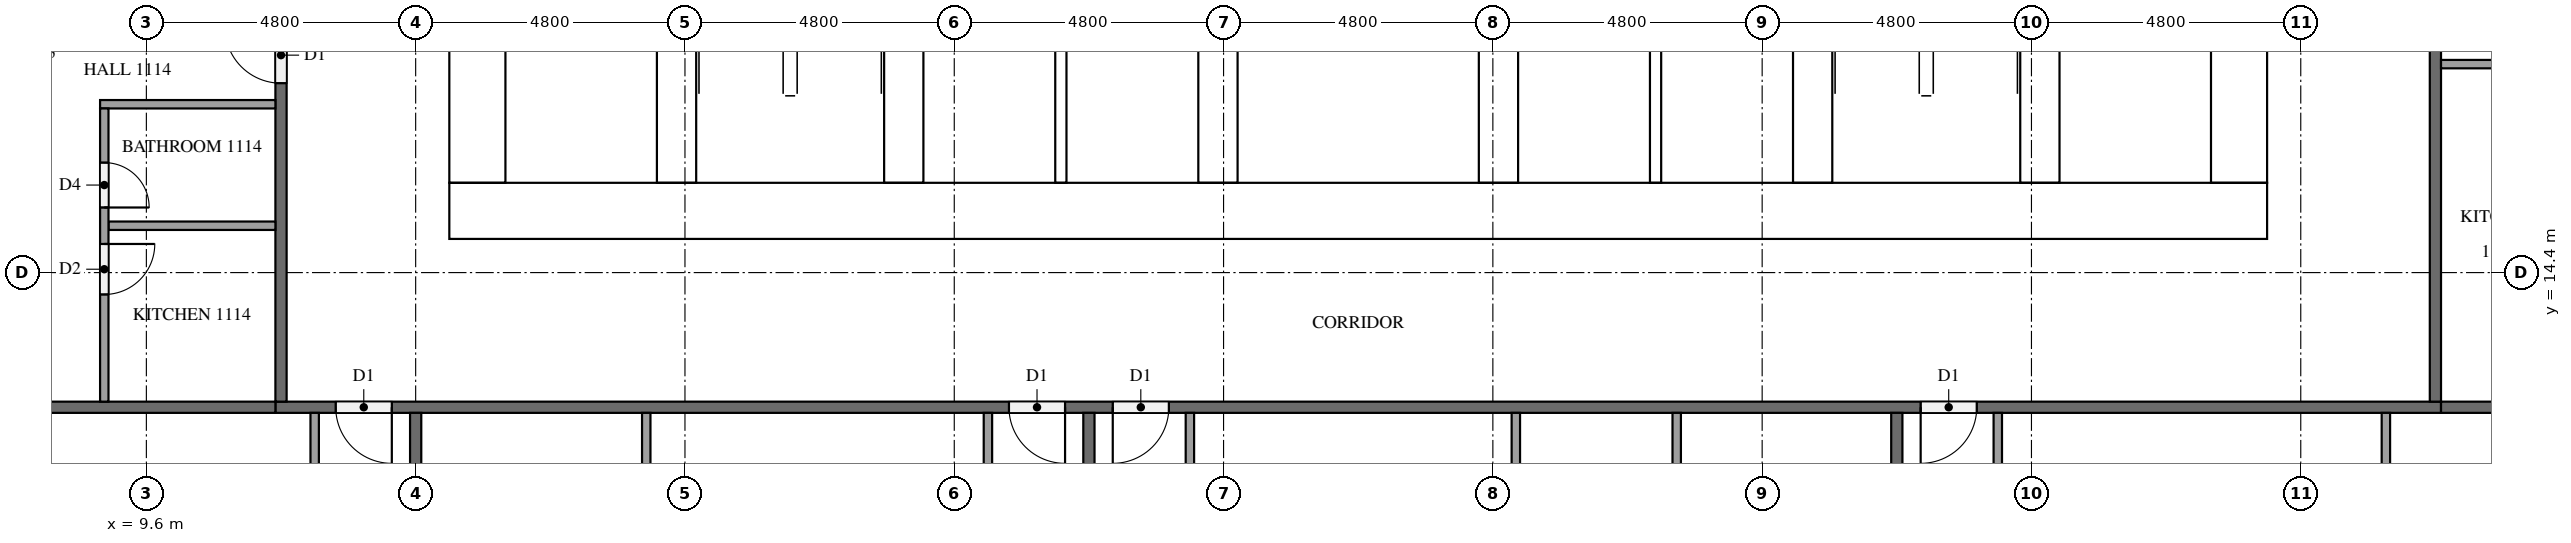
"""IFC4 building model, lengths in metres.
Left out: names, types, materials, properties, quantities, classifications, styles, units other than length and angle.
Written with IfcOpenShell. Run it as: python <this file> out.ifc"""

import sys

from ifc_helpers import new_model, si_unit, direction, frame, frame_2d, origin, place, context, subcontext, project, spatial, rectangle, extrude, element, fill, save


model = new_model("IFC4")
c1 = context("Model", 3, precision=1e-05, world=origin(), true_north=direction((0.0, 1.0)))
c2 = subcontext(c1, "Body", "Model", "MODEL_VIEW")
j1 = project(units=[si_unit("LENGTHUNIT", "METRE"), si_unit("PLANEANGLEUNIT", "RADIAN")], contexts=[c1])
p1 = place(None, origin())
s1 = spatial("IfcSite", under=j1, at=p1, CompositionType="ELEMENT")
p2 = place(p1, origin())
s2 = spatial("IfcBuilding", under=s1, at=p2, CompositionType="ELEMENT")
p3 = place(p2, frame((0.0, 0.0, 46.9)))
s3 = spatial("IfcBuildingStorey", under=s2, at=p3, CompositionType="ELEMENT", Elevation=46.9)
p4 = place(p3, frame((15.0, 15.5, 0.0), z_axis=(0.0, 0.0, 1.0), x_axis=(1.0, 0.0, 0.0)))
e1 = element("IfcWall", 1, at=p4, inside=s3, PredefinedType="SHEAR", context=c2, shape_type="SweptSolid", body=[
    extrude(rectangle(XDim=32.4, YDim=1.0, at=frame_2d((16.2, 0.0))), origin(), (0.0, 0.0, 1.0), 3.2),
])
p5 = place(p4, frame((15.3, 0.0, 0.0)))
e2 = element("IfcOpeningElement", 2, at=p5, cuts=e1, PredefinedType="OPENING", context=c2, shape_type="SweptSolid", body=[
    extrude(rectangle(XDim=1.8, YDim=2.1, at=frame_2d((0.9, 1.05))), frame((0.0, 0.51, 0.0), z_axis=(0.0, -1.0, 0.0), x_axis=(1.0, 0.0, 0.0)), (0.0, 0.0, 1.0), 1.02),
])
p6 = place(p3, frame((15.5, 16.0, 0.0), z_axis=(0.0, 0.0, 1.0), x_axis=(0.0, 1.0, 0.0)))
e3 = element("IfcWall", 3, at=p6, inside=s3, PredefinedType="SHEAR", context=c2, shape_type="SweptSolid", body=[
    extrude(rectangle(XDim=20.8, YDim=1.0, at=frame_2d((10.4, 0.0))), origin(), (0.0, 0.0, 1.0), 3.2),
])
p7 = place(p6, frame((4.76, 0.0, 0.0)))
e4 = element("IfcOpeningElement", 4, at=p7, cuts=e3, PredefinedType="OPENING", context=c2, shape_type="SweptSolid", body=[
    extrude(rectangle(XDim=1.2, YDim=2.1, at=frame_2d((0.6, 1.05))), frame((0.0, 0.51, 0.0), z_axis=(0.0, -1.0, 0.0), x_axis=(1.0, 0.0, 0.0)), (0.0, 0.0, 1.0), 1.02),
])
p8 = place(p3, frame((46.9, 16.0, 0.0), z_axis=(0.0, 0.0, 1.0), x_axis=(0.0, 1.0, 0.0)))
e5 = element("IfcWall", 5, at=p8, inside=s3, PredefinedType="SHEAR", context=c2, shape_type="SweptSolid", body=[
    extrude(rectangle(XDim=20.8, YDim=1.0, at=frame_2d((10.4, 0.0))), origin(), (0.0, 0.0, 1.0), 3.2),
])
p9 = place(p8, frame((10.1, 0.0, 0.0)))
e6 = element("IfcOpeningElement", 6, at=p9, cuts=e5, PredefinedType="OPENING", context=c2, shape_type="SweptSolid", body=[
    extrude(rectangle(XDim=1.2, YDim=2.1, at=frame_2d((0.6, 1.05))), frame((0.0, 0.51, 0.0), z_axis=(0.0, -1.0, 0.0), x_axis=(1.0, 0.0, 0.0)), (0.0, 0.0, 1.0), 1.02),
])
p10 = place(p3, frame((19.05, 16.0, 0.0), z_axis=(0.0, 0.0, 1.0), x_axis=(0.0, 1.0, 0.0)))
e7 = element("IfcWall", 7, at=p10, inside=s3, PredefinedType="SHEAR", context=c2, shape_type="SweptSolid", body=[
    extrude(rectangle(XDim=14.9, YDim=0.7, at=frame_2d((7.45, 0.0))), origin(), (0.0, 0.0, 1.0), 3.2),
])
p11 = place(p10, frame((9.45, 0.0, 0.0)))
e8 = element("IfcOpeningElement", 8, at=p11, cuts=e7, PredefinedType="OPENING", context=c2, shape_type="SweptSolid", body=[
    extrude(rectangle(XDim=1.1, YDim=2.1, at=frame_2d((0.55, 1.05))), frame((0.0, 0.36, 0.0), z_axis=(0.0, -1.0, 0.0), x_axis=(1.0, 0.0, 0.0)), (0.0, 0.0, 1.0), 0.72),
])
p12 = place(p10, frame((12.95, 0.0, 0.0)))
e9 = element("IfcOpeningElement", 9, at=p12, cuts=e7, PredefinedType="OPENING", context=c2, shape_type="SweptSolid", body=[
    extrude(rectangle(XDim=1.1, YDim=2.1, at=frame_2d((0.55, 1.05))), frame((0.0, 0.36, 0.0), z_axis=(0.0, -1.0, 0.0), x_axis=(1.0, 0.0, 0.0)), (0.0, 0.0, 1.0), 0.72),
])
p13 = place(p10, frame((0.2, 0.0, 0.0)))
e10 = element("IfcOpeningElement", 10, at=p13, cuts=e7, PredefinedType="OPENING", context=c2, shape_type="SweptSolid", body=[
    extrude(rectangle(XDim=1.2, YDim=2.1, at=frame_2d((0.6, 1.05))), frame((0.0, 0.36, 0.0), z_axis=(0.0, -1.0, 0.0), x_axis=(1.0, 0.0, 0.0)), (0.0, 0.0, 1.0), 0.72),
])
p14 = place(p3, frame((23.1, 16.0, 0.0), z_axis=(0.0, 0.0, 1.0), x_axis=(0.0, 1.0, 0.0)))
e11 = element("IfcWall", 11, at=p14, inside=s3, PredefinedType="SHEAR", context=c2, shape_type="SweptSolid", body=[
    extrude(rectangle(XDim=20.8, YDim=0.7, at=frame_2d((10.4, 0.0))), origin(), (0.0, 0.0, 1.0), 3.2),
])
p15 = place(p3, frame((39.3, 16.0, 0.0), z_axis=(0.0, 0.0, 1.0), x_axis=(0.0, 1.0, 0.0)))
e12 = element("IfcWall", 12, at=p15, inside=s3, PredefinedType="SHEAR", context=c2, shape_type="SweptSolid", body=[
    extrude(rectangle(XDim=8.25, YDim=0.7, at=frame_2d((4.125, 0.0))), origin(), (0.0, 0.0, 1.0), 3.2),
])
p16 = place(p3, frame((43.35, 16.0, 0.0), z_axis=(0.0, 0.0, 1.0), x_axis=(0.0, 1.0, 0.0)))
e13 = element("IfcWall", 13, at=p16, inside=s3, PredefinedType="SHEAR", context=c2, shape_type="SweptSolid", body=[
    extrude(rectangle(XDim=8.25, YDim=0.7, at=frame_2d((4.125, 0.0))), origin(), (0.0, 0.0, 1.0), 3.2),
])
p17 = place(p16, frame((0.2, 0.0, 0.0)))
e14 = element("IfcOpeningElement", 14, at=p17, cuts=e13, PredefinedType="OPENING", context=c2, shape_type="SweptSolid", body=[
    extrude(rectangle(XDim=1.2, YDim=2.1, at=frame_2d((0.6, 1.05))), frame((0.0, 0.36, 0.0), z_axis=(0.0, -1.0, 0.0), x_axis=(1.0, 0.0, 0.0)), (0.0, 0.0, 1.0), 0.72),
])
for number, where, z_axis, x_axis in (
    (15, (28.7, 16.0, 0.0), (0.0, 0.0, 1.0), (0.0, 1.0, 0.0)),
    (16, (33.7, 16.0, 0.0), (0.0, 0.0, 1.0), (0.0, 1.0, 0.0)),
):
    element("IfcWall", number, at=place(p3, frame(where, z_axis=z_axis, x_axis=x_axis)), inside=s3, PredefinedType="SHEAR", context=c2, shape_type="SweptSolid", body=[
        extrude(rectangle(XDim=2.4, YDim=0.7, at=frame_2d((1.2, 0.0))), origin(), (0.0, 0.0, 1.0), 3.2),
    ])
for number, where, z_axis, x_axis in (
    (17, (25.9, 16.0, 0.0), (0.0, 0.0, 1.0), (0.0, 1.0, 0.0)),
    (18, (36.5, 16.0, 0.0), (0.0, 0.0, 1.0), (0.0, 1.0, 0.0)),
):
    element("IfcWall", number, at=place(p3, frame(where, z_axis=z_axis, x_axis=x_axis)), inside=s3, PredefinedType="SOLIDWALL", context=c2, shape_type="SweptSolid", body=[
        extrude(rectangle(XDim=2.4, YDim=0.2, at=frame_2d((1.2, 0.0))), origin(), (0.0, 0.0, 1.0), 3.2),
    ])
p18 = place(p3, frame((50.5, 12.0, 0.0), z_axis=(0.0, 0.0, 1.0), x_axis=(-1.0, 0.0, 0.0)))
e19 = element("IfcWall", 19, at=p18, inside=s3, PredefinedType="PARTITIONING", context=c2, shape_type="SweptSolid", body=[
    extrude(rectangle(XDim=38.6, YDim=0.2, at=frame_2d((19.3, 0.0))), origin(), (0.0, 0.0, 1.0), 3.2),
])
p19 = place(p18, frame((36.525, 0.0, 0.0)))
e20 = element("IfcOpeningElement", 20, at=p19, cuts=e19, PredefinedType="OPENING", context=c2, shape_type="SweptSolid", body=[
    extrude(rectangle(XDim=1.0, YDim=2.1, at=frame_2d((0.5, 1.05))), frame((0.0, 0.11, 0.0), z_axis=(0.0, -1.0, 0.0), x_axis=(1.0, 0.0, 0.0)), (0.0, 0.0, 1.0), 0.22),
])
p20 = place(p18, frame((24.525, 0.0, 0.0)))
e21 = element("IfcOpeningElement", 21, at=p20, cuts=e19, PredefinedType="OPENING", context=c2, shape_type="SweptSolid", body=[
    extrude(rectangle(XDim=1.0, YDim=2.1, at=frame_2d((0.5, 1.05))), frame((0.0, 0.11, 0.0), z_axis=(0.0, -1.0, 0.0), x_axis=(1.0, 0.0, 0.0)), (0.0, 0.0, 1.0), 0.22),
])
p21 = place(p18, frame((22.675, 0.0, 0.0)))
e22 = element("IfcOpeningElement", 22, at=p21, cuts=e19, PredefinedType="OPENING", context=c2, shape_type="SweptSolid", body=[
    extrude(rectangle(XDim=1.0, YDim=2.1, at=frame_2d((0.5, 1.05))), frame((0.0, 0.11, 0.0), z_axis=(0.0, -1.0, 0.0), x_axis=(1.0, 0.0, 0.0)), (0.0, 0.0, 1.0), 0.22),
])
p22 = place(p18, frame((8.275, 0.0, 0.0)))
e23 = element("IfcOpeningElement", 23, at=p22, cuts=e19, PredefinedType="OPENING", context=c2, shape_type="SweptSolid", body=[
    extrude(rectangle(XDim=1.0, YDim=2.1, at=frame_2d((0.5, 1.05))), frame((0.0, 0.11, 0.0), z_axis=(0.0, -1.0, 0.0), x_axis=(1.0, 0.0, 0.0)), (0.0, 0.0, 1.0), 0.22),
])
p23 = place(p3, frame((50.4, 40.7, 0.0), z_axis=(0.0, 0.0, 1.0), x_axis=(0.0, -1.0, 0.0)))
e24 = element("IfcWall", 24, at=p23, inside=s3, PredefinedType="PARTITIONING", context=c2, shape_type="SweptSolid", body=[
    extrude(rectangle(XDim=28.6, YDim=0.2, at=frame_2d((14.3, 0.0))), origin(), (0.0, 0.0, 1.0), 3.2),
])
p24 = place(p23, frame((17.125, 0.0, 0.0)))
e25 = element("IfcOpeningElement", 25, at=p24, cuts=e24, PredefinedType="OPENING", context=c2, shape_type="SweptSolid", body=[
    extrude(rectangle(XDim=1.0, YDim=2.1, at=frame_2d((0.5, 1.05))), frame((0.0, 0.11, 0.0), z_axis=(0.0, -1.0, 0.0), x_axis=(1.0, 0.0, 0.0)), (0.0, 0.0, 1.0), 0.22),
])
p25 = place(p23, frame((15.275, 0.0, 0.0)))
e26 = element("IfcOpeningElement", 26, at=p25, cuts=e24, PredefinedType="OPENING", context=c2, shape_type="SweptSolid", body=[
    extrude(rectangle(XDim=1.0, YDim=2.1, at=frame_2d((0.5, 1.05))), frame((0.0, 0.11, 0.0), z_axis=(0.0, -1.0, 0.0), x_axis=(1.0, 0.0, 0.0)), (0.0, 0.0, 1.0), 0.22),
])
p26 = place(p23, frame((5.675, 0.0, 0.0)))
e27 = element("IfcOpeningElement", 27, at=p26, cuts=e24, PredefinedType="OPENING", context=c2, shape_type="SweptSolid", body=[
    extrude(rectangle(XDim=1.0, YDim=2.1, at=frame_2d((0.5, 1.05))), frame((0.0, 0.11, 0.0), z_axis=(0.0, -1.0, 0.0), x_axis=(1.0, 0.0, 0.0)), (0.0, 0.0, 1.0), 0.22),
])
p27 = place(p3, frame((12.0, 12.1, 0.0), z_axis=(0.0, 0.0, 1.0), x_axis=(0.0, 1.0, 0.0)))
e28 = element("IfcWall", 28, at=p27, inside=s3, PredefinedType="PARTITIONING", context=c2, shape_type="SweptSolid", body=[
    extrude(rectangle(XDim=28.6, YDim=0.2, at=frame_2d((14.3, 0.0))), origin(), (0.0, 0.0, 1.0), 3.2),
])
p28 = place(p27, frame((26.725, 0.0, 0.0)))
e29 = element("IfcOpeningElement", 29, at=p28, cuts=e28, PredefinedType="OPENING", context=c2, shape_type="SweptSolid", body=[
    extrude(rectangle(XDim=1.0, YDim=2.1, at=frame_2d((0.5, 1.05))), frame((0.0, 0.11, 0.0), z_axis=(0.0, -1.0, 0.0), x_axis=(1.0, 0.0, 0.0)), (0.0, 0.0, 1.0), 0.22),
])
p29 = place(p27, frame((17.125, 0.0, 0.0)))
e30 = element("IfcOpeningElement", 30, at=p29, cuts=e28, PredefinedType="OPENING", context=c2, shape_type="SweptSolid", body=[
    extrude(rectangle(XDim=1.0, YDim=2.1, at=frame_2d((0.5, 1.05))), frame((0.0, 0.11, 0.0), z_axis=(0.0, -1.0, 0.0), x_axis=(1.0, 0.0, 0.0)), (0.0, 0.0, 1.0), 0.22),
])
p30 = place(p27, frame((15.275, 0.0, 0.0)))
e31 = element("IfcOpeningElement", 31, at=p30, cuts=e28, PredefinedType="OPENING", context=c2, shape_type="SweptSolid", body=[
    extrude(rectangle(XDim=1.0, YDim=2.1, at=frame_2d((0.5, 1.05))), frame((0.0, 0.11, 0.0), z_axis=(0.0, -1.0, 0.0), x_axis=(1.0, 0.0, 0.0)), (0.0, 0.0, 1.0), 0.22),
])
p31 = place(p27, frame((5.675, 0.0, 0.0)))
e32 = element("IfcOpeningElement", 32, at=p31, cuts=e28, PredefinedType="OPENING", context=c2, shape_type="SweptSolid", body=[
    extrude(rectangle(XDim=1.0, YDim=2.1, at=frame_2d((0.5, 1.05))), frame((0.0, 0.11, 0.0), z_axis=(0.0, -1.0, 0.0), x_axis=(1.0, 0.0, 0.0)), (0.0, 0.0, 1.0), 0.22),
])
p32 = place(p3, frame((14.4, 11.9, 0.0), z_axis=(0.0, 0.0, 1.0), x_axis=(0.0, -1.0, 0.0)))
e33 = element("IfcWall", 33, at=p32, inside=s3, PredefinedType="PARTITIONING", context=c2, shape_type="SweptSolid", body=[
    extrude(rectangle(XDim=11.45, YDim=0.2, at=frame_2d((5.725, 0.0))), origin(), (0.0, 0.0, 1.0), 3.2),
])
for number, where, z_axis, x_axis in (
    (34, (0.1, 12.0, 0.0), (0.0, 0.0, 1.0), (1.0, 0.0, 0.0)),
    (35, (26.4, 11.9, 0.0), (0.0, 0.0, 1.0), (0.0, -1.0, 0.0)),
    (36, (40.8, 11.9, 0.0), (0.0, 0.0, 1.0), (0.0, -1.0, 0.0)),
):
    element("IfcWall", number, at=place(p3, frame(where, z_axis=z_axis, x_axis=x_axis)), inside=s3, PredefinedType="PARTITIONING", context=c2, shape_type="SweptSolid", body=[
        extrude(rectangle(XDim=11.8, YDim=0.2, at=frame_2d((5.9, 0.0))), origin(), (0.0, 0.0, 1.0), 3.2),
    ])
p33 = place(p3, frame((50.5, 12.0, 0.0), z_axis=(0.0, 0.0, 1.0), x_axis=(1.0, 0.0, 0.0)))
e37 = element("IfcWall", 37, at=p33, inside=s3, PredefinedType="PARTITIONING", context=c2, shape_type="SweptSolid", body=[
    extrude(rectangle(XDim=7.0, YDim=0.2, at=frame_2d((3.5, 0.0))), origin(), (0.0, 0.0, 1.0), 3.2),
])
p34 = place(p3, frame((12.6, 11.9, 0.0), z_axis=(0.0, 0.0, 1.0), x_axis=(0.0, -1.0, 0.0)))
e38 = element("IfcWall", 38, at=p34, inside=s3, PredefinedType="PARTITIONING", context=c2, shape_type="SweptSolid", body=[
    extrude(rectangle(XDim=3.875, YDim=0.15, at=frame_2d((1.938, 0.0))), origin(), (0.0, 0.0, 1.0), 3.2),
])
p35 = place(p3, frame((18.51, 11.9, 0.0), z_axis=(0.0, 0.0, 1.0), x_axis=(0.0, -1.0, 0.0)))
e39 = element("IfcWall", 39, at=p35, inside=s3, PredefinedType="PARTITIONING", context=c2, shape_type="SweptSolid", body=[
    extrude(rectangle(XDim=3.125, YDim=0.15, at=frame_2d((1.562, 0.0))), origin(), (0.0, 0.0, 1.0), 3.2),
])
p36 = place(p3, frame((24.6, 11.9, 0.0), z_axis=(0.0, 0.0, 1.0), x_axis=(0.0, -1.0, 0.0)))
e40 = element("IfcWall", 40, at=p36, inside=s3, PredefinedType="PARTITIONING", context=c2, shape_type="SweptSolid", body=[
    extrude(rectangle(XDim=3.275, YDim=0.15, at=frame_2d((1.637, 0.0))), origin(), (0.0, 0.0, 1.0), 3.2),
])
for number, where, z_axis, x_axis in (
    (41, (34.01, 11.9, 0.0), (0.0, 0.0, 1.0), (0.0, -1.0, 0.0)),
    (42, (36.877, 11.9, 0.0), (0.0, 0.0, 1.0), (0.0, -1.0, 0.0)),
):
    element("IfcWall", number, at=place(p3, frame(where, z_axis=z_axis, x_axis=x_axis)), inside=s3, PredefinedType="PARTITIONING", context=c2, shape_type="SweptSolid", body=[
        extrude(rectangle(XDim=3.575, YDim=0.15, at=frame_2d((1.788, 0.0))), origin(), (0.0, 0.0, 1.0), 3.2),
    ])
p37 = place(p3, frame((28.2, 11.9, 0.0), z_axis=(0.0, 0.0, 1.0), x_axis=(0.0, -1.0, 0.0)))
e43 = element("IfcWall", 43, at=p37, inside=s3, PredefinedType="PARTITIONING", context=c2, shape_type="SweptSolid", body=[
    extrude(rectangle(XDim=3.725, YDim=0.15, at=frame_2d((1.862, 0.0))), origin(), (0.0, 0.0, 1.0), 3.2),
])
p38 = place(p3, frame((49.517, 11.9, 0.0), z_axis=(0.0, 0.0, 1.0), x_axis=(0.0, -1.0, 0.0)))
e44 = element("IfcWall", 44, at=p38, inside=s3, PredefinedType="PARTITIONING", context=c2, shape_type="SweptSolid", body=[
    extrude(rectangle(XDim=3.875, YDim=0.15, at=frame_2d((1.938, 0.0))), origin(), (0.0, 0.0, 1.0), 3.2),
])
p39 = place(p3, frame((42.6, 11.9, 0.0), z_axis=(0.0, 0.0, 1.0), x_axis=(0.0, -1.0, 0.0)))
e45 = element("IfcWall", 45, at=p39, inside=s3, PredefinedType="PARTITIONING", context=c2, shape_type="SweptSolid", body=[
    extrude(rectangle(XDim=4.025, YDim=0.15, at=frame_2d((2.012, 0.0))), origin(), (0.0, 0.0, 1.0), 3.2),
])
p40 = place(p3, frame((50.5, 18.115, 0.0), z_axis=(0.0, 0.0, 1.0), x_axis=(1.0, 0.0, 0.0)))
e46 = element("IfcWall", 46, at=p40, inside=s3, PredefinedType="PARTITIONING", context=c2, shape_type="SweptSolid", body=[
    extrude(rectangle(XDim=2.075, YDim=0.15, at=frame_2d((1.038, 0.0))), origin(), (0.0, 0.0, 1.0), 3.2),
])
p41 = place(p3, frame((11.9, 15.235, 0.0), z_axis=(0.0, 0.0, 1.0), x_axis=(-1.0, 0.0, 0.0)))
e47 = element("IfcWall", 47, at=p41, inside=s3, PredefinedType="PARTITIONING", context=c2, shape_type="SweptSolid", body=[
    extrude(rectangle(XDim=2.975, YDim=0.15, at=frame_2d((1.487, 0.0))), origin(), (0.0, 0.0, 1.0), 3.2),
])
p42 = place(p3, frame((11.9, 17.4, 0.0), z_axis=(0.0, 0.0, 1.0), x_axis=(-1.0, 0.0, 0.0)))
e48 = element("IfcWall", 48, at=p42, inside=s3, PredefinedType="PARTITIONING", context=c2, shape_type="SweptSolid", body=[
    extrude(rectangle(XDim=3.125, YDim=0.15, at=frame_2d((1.562, 0.0))), origin(), (0.0, 0.0, 1.0), 3.2),
])
p43 = place(p3, frame((8.85, 17.325, 0.0), z_axis=(0.0, 0.0, 1.0), x_axis=(0.0, -1.0, 0.0)))
e49 = element("IfcWall", 49, at=p43, inside=s3, PredefinedType="PARTITIONING", context=c2, shape_type="SweptSolid", body=[
    extrude(rectangle(XDim=5.225, YDim=0.15, at=frame_2d((2.612, 0.0))), origin(), (0.0, 0.0, 1.0), 3.2),
])
p44 = place(p43, frame((0.965, 0.0, 0.0)))
e50 = element("IfcOpeningElement", 50, at=p44, cuts=e49, PredefinedType="OPENING", context=c2, shape_type="SweptSolid", body=[
    extrude(rectangle(XDim=0.8, YDim=2.1, at=frame_2d((0.4, 1.05))), frame((0.0, 0.085, 0.0), z_axis=(0.0, -1.0, 0.0), x_axis=(1.0, 0.0, 0.0)), (0.0, 0.0, 1.0), 0.17),
])
p45 = place(p43, frame((2.415, 0.0, 0.0)))
e51 = element("IfcOpeningElement", 51, at=p45, cuts=e49, PredefinedType="OPENING", context=c2, shape_type="SweptSolid", body=[
    extrude(rectangle(XDim=0.9, YDim=2.1, at=frame_2d((0.45, 1.05))), frame((0.0, 0.085, 0.0), z_axis=(0.0, -1.0, 0.0), x_axis=(1.0, 0.0, 0.0)), (0.0, 0.0, 1.0), 0.17),
])
p46 = place(p13, frame((1.2, 0.0, 0.0), z_axis=(0.0, 0.0, 1.0), x_axis=(-1.0, 0.0, 0.0)))
e52 = element("IfcDoor", 52, at=p46, inside=s3, OperationType="SINGLE_SWING_LEFT", PredefinedType="DOOR", context=c2, shape_type="SweptSolid", body=[
    extrude(rectangle(XDim=1.2, YDim=2.1, at=frame_2d((0.6, 1.05))), frame((0.0, 0.025, 0.0), z_axis=(0.0, -1.0, 0.0), x_axis=(1.0, 0.0, 0.0)), (0.0, 0.0, 1.0), 0.05),
])
fill(e10, e52)
p47 = place(p17, origin())
e53 = element("IfcDoor", 53, at=p47, inside=s3, OperationType="SINGLE_SWING_RIGHT", PredefinedType="DOOR", context=c2, shape_type="SweptSolid", body=[
    extrude(rectangle(XDim=1.2, YDim=2.1, at=frame_2d((0.6, 1.05))), frame((0.0, 0.025, 0.0), z_axis=(0.0, -1.0, 0.0), x_axis=(1.0, 0.0, 0.0)), (0.0, 0.0, 1.0), 0.05),
])
fill(e14, e53)
p48 = place(p5, frame((1.8, 0.0, 0.0), z_axis=(0.0, 0.0, 1.0), x_axis=(-1.0, 0.0, 0.0)))
e54 = element("IfcDoor", 54, at=p48, inside=s3, OperationType="DOUBLE_DOOR_SINGLE_SWING", PredefinedType="DOOR", context=c2, shape_type="SweptSolid", body=[
    extrude(rectangle(XDim=1.8, YDim=2.1, at=frame_2d((0.9, 1.05))), frame((0.0, 0.025, 0.0), z_axis=(0.0, -1.0, 0.0), x_axis=(1.0, 0.0, 0.0)), (0.0, 0.0, 1.0), 0.05),
])
fill(e2, e54)
p49 = place(p19, origin())
e55 = element("IfcDoor", 55, at=p49, inside=s3, OperationType="SINGLE_SWING_LEFT", PredefinedType="DOOR", context=c2, shape_type="SweptSolid", body=[
    extrude(rectangle(XDim=1.0, YDim=2.1, at=frame_2d((0.5, 1.05))), frame((0.0, 0.025, 0.0), z_axis=(0.0, -1.0, 0.0), x_axis=(1.0, 0.0, 0.0)), (0.0, 0.0, 1.0), 0.05),
])
fill(e20, e55)
p50 = place(p20, origin())
e56 = element("IfcDoor", 56, at=p50, inside=s3, OperationType="SINGLE_SWING_LEFT", PredefinedType="DOOR", context=c2, shape_type="SweptSolid", body=[
    extrude(rectangle(XDim=1.0, YDim=2.1, at=frame_2d((0.5, 1.05))), frame((0.0, 0.025, 0.0), z_axis=(0.0, -1.0, 0.0), x_axis=(1.0, 0.0, 0.0)), (0.0, 0.0, 1.0), 0.05),
])
fill(e21, e56)
p51 = place(p21, origin())
e57 = element("IfcDoor", 57, at=p51, inside=s3, OperationType="SINGLE_SWING_RIGHT", PredefinedType="DOOR", context=c2, shape_type="SweptSolid", body=[
    extrude(rectangle(XDim=1.0, YDim=2.1, at=frame_2d((0.5, 1.05))), frame((0.0, 0.025, 0.0), z_axis=(0.0, -1.0, 0.0), x_axis=(1.0, 0.0, 0.0)), (0.0, 0.0, 1.0), 0.05),
])
fill(e22, e57)
p52 = place(p22, origin())
e58 = element("IfcDoor", 58, at=p52, inside=s3, OperationType="SINGLE_SWING_RIGHT", PredefinedType="DOOR", context=c2, shape_type="SweptSolid", body=[
    extrude(rectangle(XDim=1.0, YDim=2.1, at=frame_2d((0.5, 1.05))), frame((0.0, 0.025, 0.0), z_axis=(0.0, -1.0, 0.0), x_axis=(1.0, 0.0, 0.0)), (0.0, 0.0, 1.0), 0.05),
])
fill(e23, e58)
p53 = place(p31, origin())
e59 = element("IfcDoor", 59, at=p53, inside=s3, OperationType="SINGLE_SWING_RIGHT", PredefinedType="DOOR", context=c2, shape_type="SweptSolid", body=[
    extrude(rectangle(XDim=1.0, YDim=2.1, at=frame_2d((0.5, 1.05))), frame((0.0, 0.025, 0.0), z_axis=(0.0, -1.0, 0.0), x_axis=(1.0, 0.0, 0.0)), (0.0, 0.0, 1.0), 0.05),
])
fill(e32, e59)
p54 = place(p44, origin())
e60 = element("IfcDoor", 60, at=p54, inside=s3, OperationType="SINGLE_SWING_RIGHT", PredefinedType="DOOR", context=c2, shape_type="SweptSolid", body=[
    extrude(rectangle(XDim=0.8, YDim=2.1, at=frame_2d((0.4, 1.05))), frame((0.0, 0.025, 0.0), z_axis=(0.0, -1.0, 0.0), x_axis=(1.0, 0.0, 0.0)), (0.0, 0.0, 1.0), 0.05),
])
fill(e50, e60)
p55 = place(p45, origin())
e61 = element("IfcDoor", 61, at=p55, inside=s3, OperationType="SINGLE_SWING_LEFT", PredefinedType="DOOR", context=c2, shape_type="SweptSolid", body=[
    extrude(rectangle(XDim=0.9, YDim=2.1, at=frame_2d((0.45, 1.05))), frame((0.0, 0.025, 0.0), z_axis=(0.0, -1.0, 0.0), x_axis=(1.0, 0.0, 0.0)), (0.0, 0.0, 1.0), 0.05),
])
fill(e51, e61)
save(model, sys.argv[1])
